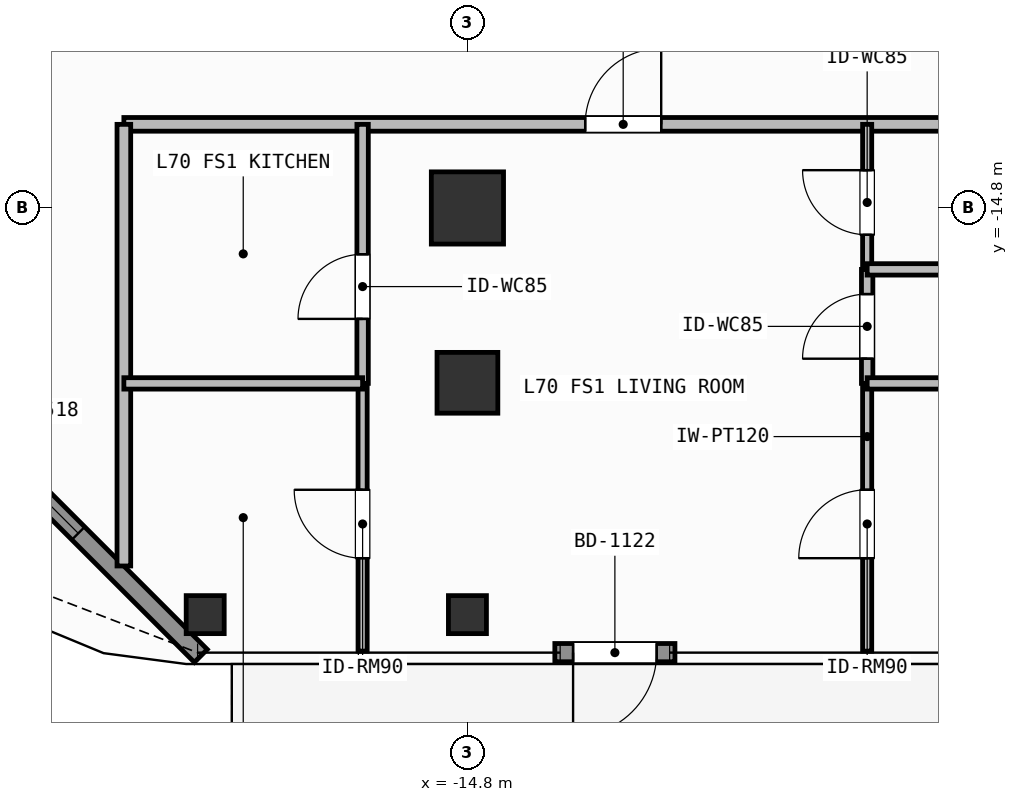
"""IFC4 building model, lengths in metres.
Left out: names, types, materials, properties, quantities, classifications, styles, units other than length and angle.
Written with IfcOpenShell. Run it as: python <this file> out.ifc"""

import sys

from ifc_helpers import new_model, si_unit, direction, frame, frame_2d, origin, origin_2d, place, context, subcontext, project, spatial, rectangle, hollow_rectangle, extrude, element, fill, save


model = new_model("IFC4")
c1 = context("Model", 3, precision=1e-05, world=origin(), true_north=direction((0.0, 1.0)))
c2 = subcontext(c1, "Body", "Model", "MODEL_VIEW")
j1 = project(units=[si_unit("LENGTHUNIT", "METRE"), si_unit("PLANEANGLEUNIT", "RADIAN")], contexts=[c1])
p1 = place(None, origin())
s1 = spatial("IfcSite", under=j1, at=p1, CompositionType="ELEMENT")
p2 = place(p1, origin())
s2 = spatial("IfcBuilding", under=s1, at=p2, CompositionType="ELEMENT")
p3 = place(p2, frame((0.0, 0.0, 285.9)))
s3 = spatial("IfcBuildingStorey", under=s2, at=p3, CompositionType="ELEMENT", Elevation=285.9)
p4 = place(p3, frame((-14.8, -14.8, 0.0), z_axis=(0.0, 0.0, 1.0), x_axis=(1.0, 0.0, 0.0)))
e1 = element("IfcColumn", 1, at=p4, inside=s3, PredefinedType="COLUMN", context=c2, shape_type="SweptSolid", body=[
    extrude(rectangle(XDim=0.95, YDim=0.95, at=origin_2d()), origin(), (0.0, 0.0, 1.0), 3.9),
])
p5 = place(p3, frame((-14.8, -17.1, 0.0), z_axis=(0.0, 0.0, 1.0), x_axis=(1.0, 0.0, 0.0)))
e2 = element("IfcColumn", 2, at=p5, inside=s3, PredefinedType="COLUMN", context=c2, shape_type="SweptSolid", body=[
    extrude(hollow_rectangle(XDim=0.8, YDim=0.8, WallThickness=0.036, at=origin_2d()), origin(), (0.0, 0.0, 1.0), 3.9),
])
for number, where, z_axis, x_axis in (
    (3, (-18.25, -20.15, 0.0), (0.0, 0.0, 1.0), (1.0, 0.0, 0.0)),
    (4, (-14.8, -20.15, 0.0), (0.0, 0.0, 1.0), (1.0, 0.0, 0.0)),
):
    element("IfcColumn", number, at=place(p3, frame(where, z_axis=z_axis, x_axis=x_axis)), inside=s3, PredefinedType="COLUMN", context=c2, shape_type="SweptSolid", body=[
        extrude(hollow_rectangle(XDim=0.5, YDim=0.5, WallThickness=0.025, at=origin_2d()), origin(), (0.0, 0.0, 1.0), 3.9),
    ])
p6 = place(p3, frame((-12.07, -20.65, 0.0), z_axis=(0.0, 0.0, 1.0), x_axis=(-1.0, 0.0, 0.0)))
e5 = element("IfcWall", 5, at=p6, inside=s3, PredefinedType="SOLIDWALL", context=c2, shape_type="SweptSolid", body=[
    extrude(rectangle(XDim=1.58, YDim=0.24, at=frame_2d((0.79, 0.0))), origin(), (0.0, 0.0, 1.0), 3.68),
])
p7 = place(p6, frame((0.24, 0.0, 0.0)))
e6 = element("IfcOpeningElement", 6, at=p7, cuts=e5, PredefinedType="OPENING", context=c2, shape_type="SweptSolid", body=[
    extrude(rectangle(XDim=1.1, YDim=2.2, at=frame_2d((0.55, 1.1))), frame((0.0, 0.13, 0.0), z_axis=(0.0, -1.0, 0.0), x_axis=(1.0, 0.0, 0.0)), (0.0, 0.0, 1.0), 0.26),
])
p8 = place(p3, frame((-18.308, -20.692, 0.0), z_axis=(0.0, 0.0, 1.0), x_axis=(-0.707106781187, 0.707106781187, 0.0)))
e7 = element("IfcWall", 7, at=p8, inside=s3, PredefinedType="SOLIDWALL", context=c2, shape_type="SweptSolid", body=[
    extrude(rectangle(XDim=6.059, YDim=0.24, at=frame_2d((3.03, 0.0))), origin(), (0.0, 0.0, 1.0), 3.68),
])
p9 = place(p8, frame((2.28, 0.0, 0.8)))
e8 = element("IfcOpeningElement", 8, at=p9, cuts=e7, PredefinedType="OPENING", context=c2, shape_type="SweptSolid", body=[
    extrude(rectangle(XDim=1.5, YDim=1.85, at=frame_2d((0.75, 0.925))), frame((0.0, 0.13, 0.0), z_axis=(0.0, -1.0, 0.0), x_axis=(1.0, 0.0, 0.0)), (0.0, 0.0, 1.0), 0.26),
])
p10 = place(p3, frame((-19.32, -13.7, 0.0), z_axis=(0.0, 0.0, 1.0), x_axis=(1.0, 0.0, 0.0)))
e9 = element("IfcWall", 9, at=p10, inside=s3, PredefinedType="PARTITIONING", context=c2, shape_type="SweptSolid", body=[
    extrude(rectangle(XDim=14.213, YDim=0.18, at=frame_2d((7.106, 0.0))), origin(), (0.0, 0.0, 1.0), 3.68),
])
p11 = place(p10, frame((6.069, 0.0, 0.0)))
e10 = element("IfcOpeningElement", 10, at=p11, cuts=e9, PredefinedType="OPENING", context=c2, shape_type="SweptSolid", body=[
    extrude(rectangle(XDim=1.0, YDim=2.2, at=frame_2d((0.5, 1.1))), frame((0.0, 0.1, 0.0), z_axis=(0.0, -1.0, 0.0), x_axis=(1.0, 0.0, 0.0)), (0.0, 0.0, 1.0), 0.2),
])
p12 = place(p3, frame((-16.179, -17.108, 0.0), z_axis=(0.0, 0.0, 1.0), x_axis=(0.0, 1.0, 0.0)))
e11 = element("IfcWall", 11, at=p12, inside=s3, PredefinedType="PARTITIONING", context=c2, shape_type="SweptSolid", body=[
    extrude(rectangle(XDim=3.408, YDim=0.15, at=frame_2d((1.704, 0.0))), origin(), (0.0, 0.0, 1.0), 3.68),
])
p13 = place(p12, frame((0.849, 0.0, 0.0)))
e12 = element("IfcOpeningElement", 12, at=p13, cuts=e11, PredefinedType="OPENING", context=c2, shape_type="SweptSolid", body=[
    extrude(rectangle(XDim=0.85, YDim=2.1, at=frame_2d((0.425, 1.05))), frame((0.0, 0.085, 0.0), z_axis=(0.0, -1.0, 0.0), x_axis=(1.0, 0.0, 0.0)), (0.0, 0.0, 1.0), 0.17),
])
p14 = place(p3, frame((-16.179, -20.63, 0.0), z_axis=(0.0, 0.0, 1.0), x_axis=(0.0, 1.0, 0.0)))
e13 = element("IfcWall", 13, at=p14, inside=s3, PredefinedType="PARTITIONING", context=c2, shape_type="SweptSolid", body=[
    extrude(rectangle(XDim=3.522, YDim=0.12, at=frame_2d((1.761, 0.0))), origin(), (0.0, 0.0, 1.0), 3.68),
])
p15 = place(p14, frame((1.222, 0.0, 0.0)))
e14 = element("IfcOpeningElement", 14, at=p15, cuts=e13, PredefinedType="OPENING", context=c2, shape_type="SweptSolid", body=[
    extrude(rectangle(XDim=0.9, YDim=2.1, at=frame_2d((0.45, 1.05))), frame((0.0, 0.07, 0.0), z_axis=(0.0, -1.0, 0.0), x_axis=(1.0, 0.0, 0.0)), (0.0, 0.0, 1.0), 0.14),
])
p16 = place(p3, frame((-9.541, -17.108, 0.0), z_axis=(0.0, 0.0, 1.0), x_axis=(0.0, 1.0, 0.0)))
e15 = element("IfcWall", 15, at=p16, inside=s3, PredefinedType="PARTITIONING", context=c2, shape_type="SweptSolid", body=[
    extrude(rectangle(XDim=1.5, YDim=0.15, at=frame_2d((0.75, 0.0))), origin(), (0.0, 0.0, 1.0), 3.68),
])
p17 = place(p16, frame((0.325, 0.0, 0.0)))
e16 = element("IfcOpeningElement", 16, at=p17, cuts=e15, PredefinedType="OPENING", context=c2, shape_type="SweptSolid", body=[
    extrude(rectangle(XDim=0.85, YDim=2.1, at=frame_2d((0.425, 1.05))), frame((0.0, 0.085, 0.0), z_axis=(0.0, -1.0, 0.0), x_axis=(1.0, 0.0, 0.0)), (0.0, 0.0, 1.0), 0.17),
])
p18 = place(p3, frame((-9.541, -15.608, 0.0), z_axis=(0.0, 0.0, 1.0), x_axis=(0.0, 1.0, 0.0)))
e17 = element("IfcWall", 17, at=p18, inside=s3, PredefinedType="PARTITIONING", context=c2, shape_type="SweptSolid", body=[
    extrude(rectangle(XDim=1.908, YDim=0.12, at=frame_2d((0.954, 0.0))), origin(), (0.0, 0.0, 1.0), 3.68),
])
p19 = place(p18, frame((0.455, 0.0, 0.0)))
e18 = element("IfcOpeningElement", 18, at=p19, cuts=e17, PredefinedType="OPENING", context=c2, shape_type="SweptSolid", body=[
    extrude(rectangle(XDim=0.85, YDim=2.1, at=frame_2d((0.425, 1.05))), frame((0.0, 0.07, 0.0), z_axis=(0.0, -1.0, 0.0), x_axis=(1.0, 0.0, 0.0)), (0.0, 0.0, 1.0), 0.14),
])
p20 = place(p3, frame((-9.541, -20.63, 0.0), z_axis=(0.0, 0.0, 1.0), x_axis=(0.0, 1.0, 0.0)))
e19 = element("IfcWall", 19, at=p20, inside=s3, PredefinedType="PARTITIONING", context=c2, shape_type="SweptSolid", body=[
    extrude(rectangle(XDim=3.522, YDim=0.12, at=frame_2d((1.761, 0.0))), origin(), (0.0, 0.0, 1.0), 3.68),
])
p21 = place(p20, frame((1.222, 0.0, 0.0)))
e20 = element("IfcOpeningElement", 20, at=p21, cuts=e19, PredefinedType="OPENING", context=c2, shape_type="SweptSolid", body=[
    extrude(rectangle(XDim=0.9, YDim=2.1, at=frame_2d((0.45, 1.05))), frame((0.0, 0.07, 0.0), z_axis=(0.0, -1.0, 0.0), x_axis=(1.0, 0.0, 0.0)), (0.0, 0.0, 1.0), 0.14),
])
p22 = place(p3, frame((-19.32, -19.51, 0.0), z_axis=(0.0, 0.0, 1.0), x_axis=(0.0, 1.0, 0.0)))
e21 = element("IfcWall", 21, at=p22, inside=s3, PredefinedType="PARTITIONING", context=c2, shape_type="SweptSolid", body=[
    extrude(rectangle(XDim=5.81, YDim=0.18, at=frame_2d((2.905, 0.0))), origin(), (0.0, 0.0, 1.0), 3.68),
])
p23 = place(p3, frame((-19.32, -17.108, 0.0), z_axis=(0.0, 0.0, 1.0), x_axis=(1.0, 0.0, 0.0)))
e22 = element("IfcWall", 22, at=p23, inside=s3, PredefinedType="PARTITIONING", context=c2, shape_type="SweptSolid", body=[
    extrude(rectangle(XDim=3.141, YDim=0.15, at=frame_2d((1.571, 0.0))), origin(), (0.0, 0.0, 1.0), 3.68),
])
p24 = place(p3, frame((-9.541, -15.608, 0.0), z_axis=(0.0, 0.0, 1.0), x_axis=(1.0, 0.0, 0.0)))
e23 = element("IfcWall", 23, at=p24, inside=s3, PredefinedType="PARTITIONING", context=c2, shape_type="SweptSolid", body=[
    extrude(rectangle(XDim=4.434, YDim=0.15, at=frame_2d((2.217, 0.0))), origin(), (0.0, 0.0, 1.0), 3.68),
])
p25 = place(p3, frame((-9.541, -17.108, 0.0), z_axis=(0.0, 0.0, 1.0), x_axis=(1.0, 0.0, 0.0)))
e24 = element("IfcWall", 24, at=p25, inside=s3, PredefinedType="PARTITIONING", context=c2, shape_type="SweptSolid", body=[
    extrude(rectangle(XDim=4.434, YDim=0.15, at=frame_2d((2.217, 0.0))), origin(), (0.0, 0.0, 1.0), 3.182),
])
p26 = place(p7, origin())
e25 = element("IfcDoor", 25, at=p26, inside=s3, OperationType="SINGLE_SWING_RIGHT", PredefinedType="DOOR", context=c2, shape_type="SweptSolid", body=[
    extrude(rectangle(XDim=1.1, YDim=2.2, at=frame_2d((0.55, 1.1))), frame((0.0, 0.025, 0.0), z_axis=(0.0, -1.0, 0.0), x_axis=(1.0, 0.0, 0.0)), (0.0, 0.0, 1.0), 0.05),
])
fill(e6, e25)
p27 = place(p9, origin())
e26 = element("IfcWindow", 26, at=p27, inside=s3, PartitioningType="SINGLE_PANEL", PredefinedType="WINDOW", context=c2, shape_type="SweptSolid", body=[
    extrude(rectangle(XDim=1.5, YDim=1.85, at=frame_2d((0.75, 0.925))), frame((0.0, 0.03, 0.0), z_axis=(0.0, -1.0, 0.0), x_axis=(1.0, 0.0, 0.0)), (0.0, 0.0, 1.0), 0.06),
])
fill(e8, e26)
p28 = place(p11, origin())
e27 = element("IfcDoor", 27, at=p28, inside=s3, OperationType="SINGLE_SWING_RIGHT", PredefinedType="DOOR", context=c2, shape_type="SweptSolid", body=[
    extrude(rectangle(XDim=1.0, YDim=2.2, at=frame_2d((0.5, 1.1))), frame((0.0, 0.025, 0.0), z_axis=(0.0, -1.0, 0.0), x_axis=(1.0, 0.0, 0.0)), (0.0, 0.0, 1.0), 0.05),
])
fill(e10, e27)
p29 = place(p13, origin())
e28 = element("IfcDoor", 28, at=p29, inside=s3, OperationType="SINGLE_SWING_LEFT", PredefinedType="DOOR", context=c2, shape_type="SweptSolid", body=[
    extrude(rectangle(XDim=0.85, YDim=2.1, at=frame_2d((0.425, 1.05))), frame((0.0, 0.025, 0.0), z_axis=(0.0, -1.0, 0.0), x_axis=(1.0, 0.0, 0.0)), (0.0, 0.0, 1.0), 0.05),
])
fill(e12, e28)
p30 = place(p15, origin())
e29 = element("IfcDoor", 29, at=p30, inside=s3, OperationType="SINGLE_SWING_RIGHT", PredefinedType="DOOR", context=c2, shape_type="SweptSolid", body=[
    extrude(rectangle(XDim=0.9, YDim=2.1, at=frame_2d((0.45, 1.05))), frame((0.0, 0.025, 0.0), z_axis=(0.0, -1.0, 0.0), x_axis=(1.0, 0.0, 0.0)), (0.0, 0.0, 1.0), 0.05),
])
fill(e14, e29)
p31 = place(p17, origin())
e30 = element("IfcDoor", 30, at=p31, inside=s3, OperationType="SINGLE_SWING_LEFT", PredefinedType="DOOR", context=c2, shape_type="SweptSolid", body=[
    extrude(rectangle(XDim=0.85, YDim=2.1, at=frame_2d((0.425, 1.05))), frame((0.0, 0.025, 0.0), z_axis=(0.0, -1.0, 0.0), x_axis=(1.0, 0.0, 0.0)), (0.0, 0.0, 1.0), 0.05),
])
fill(e16, e30)
p32 = place(p19, origin())
e31 = element("IfcDoor", 31, at=p32, inside=s3, OperationType="SINGLE_SWING_RIGHT", PredefinedType="DOOR", context=c2, shape_type="SweptSolid", body=[
    extrude(rectangle(XDim=0.85, YDim=2.1, at=frame_2d((0.425, 1.05))), frame((0.0, 0.025, 0.0), z_axis=(0.0, -1.0, 0.0), x_axis=(1.0, 0.0, 0.0)), (0.0, 0.0, 1.0), 0.05),
])
fill(e18, e31)
p33 = place(p21, origin())
e32 = element("IfcDoor", 32, at=p33, inside=s3, OperationType="SINGLE_SWING_LEFT", PredefinedType="DOOR", context=c2, shape_type="SweptSolid", body=[
    extrude(rectangle(XDim=0.9, YDim=2.1, at=frame_2d((0.45, 1.05))), frame((0.0, 0.025, 0.0), z_axis=(0.0, -1.0, 0.0), x_axis=(1.0, 0.0, 0.0)), (0.0, 0.0, 1.0), 0.05),
])
fill(e20, e32)
save(model, sys.argv[1])
